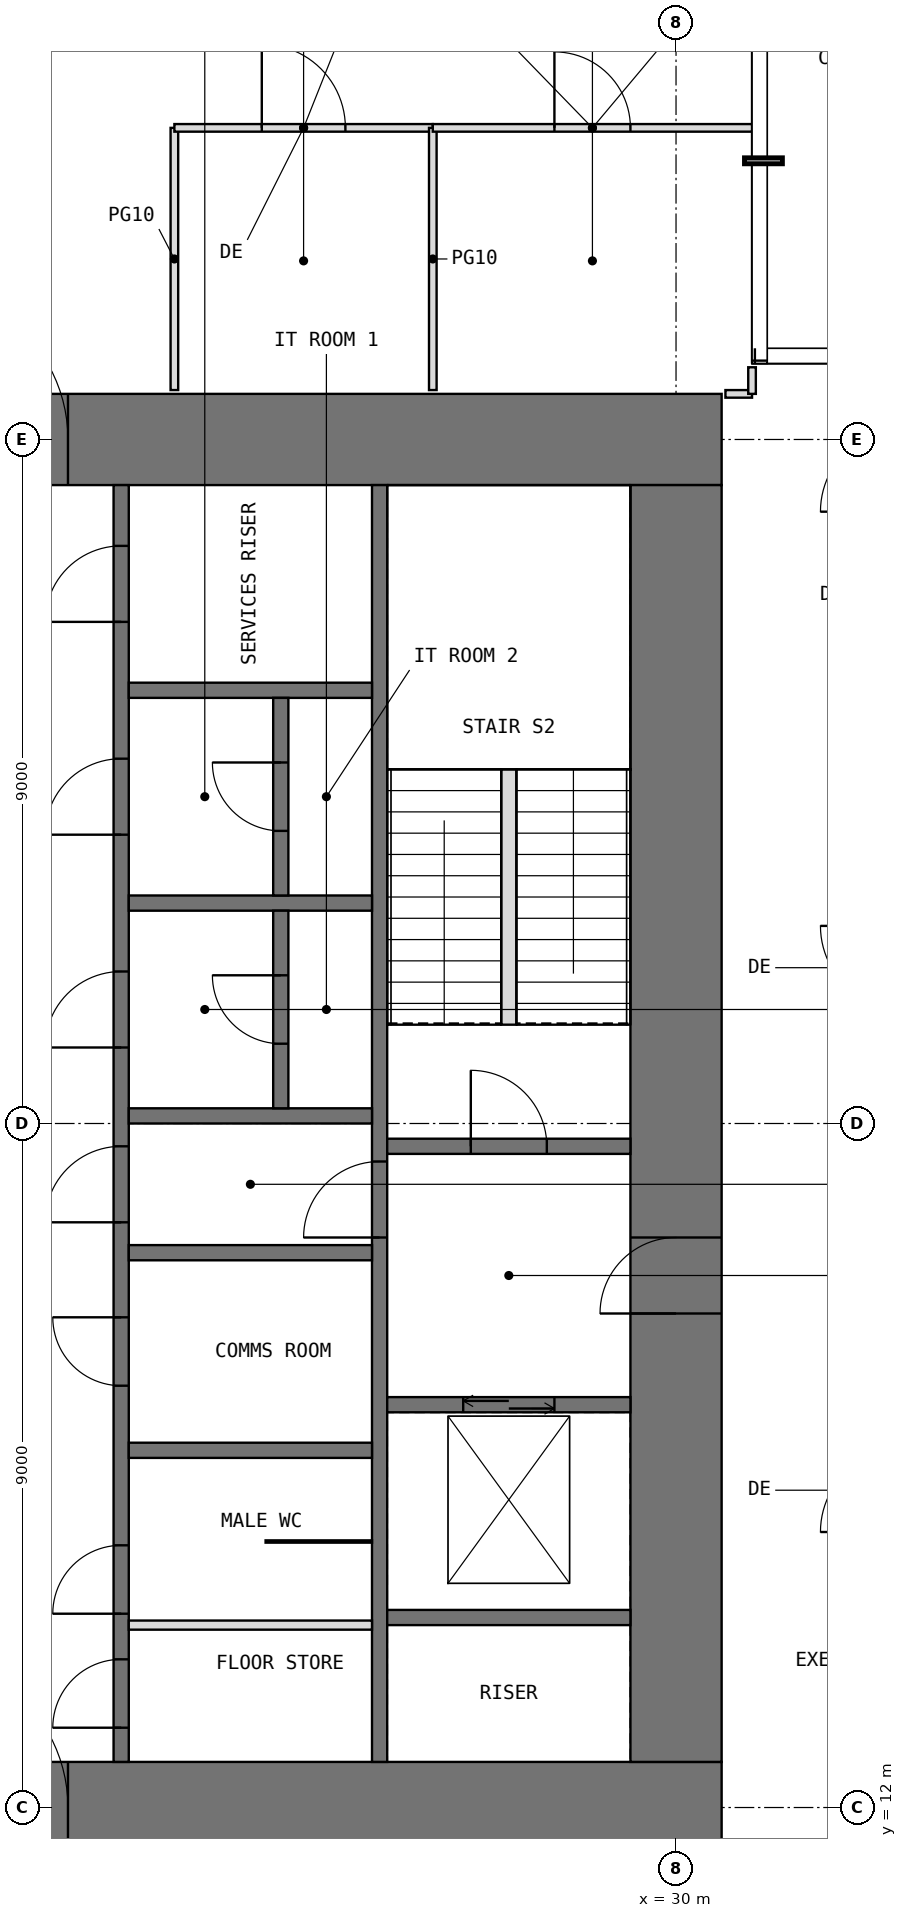
"""IFC4 building model, lengths in metres.
Left out: names, types, materials, properties, quantities, classifications, styles, units other than length and angle.
Written with IfcOpenShell. Run it as: python <this file> out.ifc"""

import sys

from ifc_helpers import new_model, si_unit, direction, frame, frame_2d, origin, place, context, subcontext, project, spatial, rectangle, extrude, element, fill, save


model = new_model("IFC4")
c1 = context("Model", 3, precision=1e-05, world=origin(), true_north=direction((0.0, 1.0)))
c2 = subcontext(c1, "Body", "Model", "MODEL_VIEW")
j1 = project(units=[si_unit("LENGTHUNIT", "METRE"), si_unit("PLANEANGLEUNIT", "RADIAN")], contexts=[c1])
p1 = place(None, origin())
s1 = spatial("IfcSite", under=j1, at=p1, CompositionType="ELEMENT")
p2 = place(p1, origin())
s2 = spatial("IfcBuilding", under=s1, at=p2, CompositionType="ELEMENT")
p3 = place(p2, frame((0.0, 0.0, 248.2)))
s3 = spatial("IfcBuildingStorey", under=s2, at=p3, CompositionType="ELEMENT", Elevation=248.2)
p4 = place(p3, frame((11.4, 12.0, -0.05), z_axis=(0.0, 0.0, 1.0), x_axis=(1.0, 0.0, 0.0)))
e1 = element("IfcWall", 1, at=p4, inside=s3, PredefinedType="SHEAR", context=c2, shape_type="SweptSolid", body=[
    extrude(rectangle(XDim=19.2, YDim=1.2, at=frame_2d((9.6, 0.0))), origin(), (0.0, 0.0, 1.0), 4.2),
])
p5 = place(p4, frame((8.6, 0.0, 0.05)))
e2 = element("IfcOpeningElement", 2, at=p5, cuts=e1, PredefinedType="OPENING", context=c2, shape_type="SweptSolid", body=[
    extrude(rectangle(XDim=2.0, YDim=2.2, at=frame_2d((1.0, 1.1))), frame((0.0, 0.61, 0.0), z_axis=(0.0, -1.0, 0.0), x_axis=(1.0, 0.0, 0.0)), (0.0, 0.0, 1.0), 1.22),
])
p6 = place(p3, frame((11.4, 30.0, -0.05), z_axis=(0.0, 0.0, 1.0), x_axis=(1.0, 0.0, 0.0)))
e3 = element("IfcWall", 3, at=p6, inside=s3, PredefinedType="SHEAR", context=c2, shape_type="SweptSolid", body=[
    extrude(rectangle(XDim=19.2, YDim=1.2, at=frame_2d((9.6, 0.0))), origin(), (0.0, 0.0, 1.0), 4.2),
])
p7 = place(p6, frame((8.6, 0.0, 0.05)))
e4 = element("IfcOpeningElement", 4, at=p7, cuts=e3, PredefinedType="OPENING", context=c2, shape_type="SweptSolid", body=[
    extrude(rectangle(XDim=2.0, YDim=2.2, at=frame_2d((1.0, 1.1))), frame((0.0, 0.61, 0.0), z_axis=(0.0, -1.0, 0.0), x_axis=(1.0, 0.0, 0.0)), (0.0, 0.0, 1.0), 1.22),
])
p8 = place(p3, frame((30.0, 12.6, -0.05), z_axis=(0.0, 0.0, 1.0), x_axis=(0.0, 1.0, 0.0)))
e5 = element("IfcWall", 5, at=p8, inside=s3, PredefinedType="SHEAR", context=c2, shape_type="SweptSolid", body=[
    extrude(rectangle(XDim=16.8, YDim=1.2, at=frame_2d((8.4, 0.0))), origin(), (0.0, 0.0, 1.0), 4.2),
])
p9 = place(p8, frame((5.9, 0.0, 0.05)))
e6 = element("IfcOpeningElement", 6, at=p9, cuts=e5, PredefinedType="OPENING", context=c2, shape_type="SweptSolid", body=[
    extrude(rectangle(XDim=1.0, YDim=2.2, at=frame_2d((0.5, 1.1))), frame((0.0, 0.61, 0.0), z_axis=(0.0, -1.0, 0.0), x_axis=(1.0, 0.0, 0.0)), (0.0, 0.0, 1.0), 1.22),
])
p10 = place(p3, frame((22.7, 12.6, -0.05), z_axis=(0.0, 0.0, 1.0), x_axis=(0.0, 1.0, 0.0)))
e7 = element("IfcWall", 7, at=p10, inside=s3, PredefinedType="SHEAR", context=c2, shape_type="SweptSolid", body=[
    extrude(rectangle(XDim=16.8, YDim=0.2, at=frame_2d((8.4, 0.0))), origin(), (0.0, 0.0, 1.0), 4.2),
])
p11 = place(p10, frame((0.45, 0.0, 0.05)))
e8 = element("IfcOpeningElement", 8, at=p11, cuts=e7, PredefinedType="OPENING", context=c2, shape_type="SweptSolid", body=[
    extrude(rectangle(XDim=0.9, YDim=2.2, at=frame_2d((0.45, 1.1))), frame((0.0, 0.11, 0.0), z_axis=(0.0, -1.0, 0.0), x_axis=(1.0, 0.0, 0.0)), (0.0, 0.0, 1.0), 0.22),
])
p12 = place(p10, frame((7.1, 0.0, 0.05)))
e9 = element("IfcOpeningElement", 9, at=p12, cuts=e7, PredefinedType="OPENING", context=c2, shape_type="SweptSolid", body=[
    extrude(rectangle(XDim=1.0, YDim=2.2, at=frame_2d((0.5, 1.1))), frame((0.0, 0.11, 0.0), z_axis=(0.0, -1.0, 0.0), x_axis=(1.0, 0.0, 0.0)), (0.0, 0.0, 1.0), 0.22),
])
p13 = place(p10, frame((1.95, 0.0, 0.05)))
e10 = element("IfcOpeningElement", 10, at=p13, cuts=e7, PredefinedType="OPENING", context=c2, shape_type="SweptSolid", body=[
    extrude(rectangle(XDim=0.9, YDim=2.2, at=frame_2d((0.45, 1.1))), frame((0.0, 0.11, 0.0), z_axis=(0.0, -1.0, 0.0), x_axis=(1.0, 0.0, 0.0)), (0.0, 0.0, 1.0), 0.22),
])
p14 = place(p10, frame((4.95, 0.0, 0.05)))
e11 = element("IfcOpeningElement", 11, at=p14, cuts=e7, PredefinedType="OPENING", context=c2, shape_type="SweptSolid", body=[
    extrude(rectangle(XDim=0.9, YDim=2.2, at=frame_2d((0.45, 1.1))), frame((0.0, 0.11, 0.0), z_axis=(0.0, -1.0, 0.0), x_axis=(1.0, 0.0, 0.0)), (0.0, 0.0, 1.0), 0.22),
])
p15 = place(p10, frame((9.4, 0.0, 0.05)))
e12 = element("IfcOpeningElement", 12, at=p15, cuts=e7, PredefinedType="OPENING", context=c2, shape_type="SweptSolid", body=[
    extrude(rectangle(XDim=1.0, YDim=2.2, at=frame_2d((0.5, 1.1))), frame((0.0, 0.11, 0.0), z_axis=(0.0, -1.0, 0.0), x_axis=(1.0, 0.0, 0.0)), (0.0, 0.0, 1.0), 0.22),
])
p16 = place(p10, frame((12.2, 0.0, 0.05)))
e13 = element("IfcOpeningElement", 13, at=p16, cuts=e7, PredefinedType="OPENING", context=c2, shape_type="SweptSolid", body=[
    extrude(rectangle(XDim=1.0, YDim=2.2, at=frame_2d((0.5, 1.1))), frame((0.0, 0.11, 0.0), z_axis=(0.0, -1.0, 0.0), x_axis=(1.0, 0.0, 0.0)), (0.0, 0.0, 1.0), 0.22),
])
p17 = place(p10, frame((15.0, 0.0, 0.05)))
e14 = element("IfcOpeningElement", 14, at=p17, cuts=e7, PredefinedType="OPENING", context=c2, shape_type="SweptSolid", body=[
    extrude(rectangle(XDim=1.0, YDim=2.2, at=frame_2d((0.5, 1.1))), frame((0.0, 0.11, 0.0), z_axis=(0.0, -1.0, 0.0), x_axis=(1.0, 0.0, 0.0)), (0.0, 0.0, 1.0), 0.22),
])
p18 = place(p3, frame((26.1, 12.6, -0.05), z_axis=(0.0, 0.0, 1.0), x_axis=(0.0, 1.0, 0.0)))
e15 = element("IfcWall", 15, at=p18, inside=s3, PredefinedType="SHEAR", context=c2, shape_type="SweptSolid", body=[
    extrude(rectangle(XDim=16.8, YDim=0.2, at=frame_2d((8.4, 0.0))), origin(), (0.0, 0.0, 1.0), 4.2),
])
p19 = place(p18, frame((6.9, 0.0, 0.05)))
e16 = element("IfcOpeningElement", 16, at=p19, cuts=e15, PredefinedType="OPENING", context=c2, shape_type="SweptSolid", body=[
    extrude(rectangle(XDim=1.0, YDim=2.2, at=frame_2d((0.5, 1.1))), frame((0.0, 0.11, 0.0), z_axis=(0.0, -1.0, 0.0), x_axis=(1.0, 0.0, 0.0)), (0.0, 0.0, 1.0), 0.22),
])
for number, where, z_axis, x_axis in (
    (17, (22.8, 16.7, -0.05), (0.0, 0.0, 1.0), (1.0, 0.0, 0.0)),
    (18, (22.8, 19.3, -0.05), (0.0, 0.0, 1.0), (1.0, 0.0, 0.0)),
    (19, (22.8, 21.1, -0.05), (0.0, 0.0, 1.0), (1.0, 0.0, 0.0)),
    (20, (22.8, 23.9, -0.05), (0.0, 0.0, 1.0), (1.0, 0.0, 0.0)),
    (21, (22.8, 26.7, -0.05), (0.0, 0.0, 1.0), (1.0, 0.0, 0.0)),
    (22, (26.2, 14.5, -0.05), (0.0, 0.0, 1.0), (1.0, 0.0, 0.0)),
):
    element("IfcWall", number, at=place(p3, frame(where, z_axis=z_axis, x_axis=x_axis)), inside=s3, PredefinedType="SHEAR", context=c2, shape_type="SweptSolid", body=[
        extrude(rectangle(XDim=3.2, YDim=0.2, at=frame_2d((1.6, 0.0))), origin(), (0.0, 0.0, 1.0), 4.2),
    ])
p20 = place(p3, frame((26.2, 17.3, -0.05), z_axis=(0.0, 0.0, 1.0), x_axis=(1.0, 0.0, 0.0)))
e23 = element("IfcWall", 23, at=p20, inside=s3, PredefinedType="SHEAR", context=c2, shape_type="SweptSolid", body=[
    extrude(rectangle(XDim=3.2, YDim=0.2, at=frame_2d((1.6, 0.0))), origin(), (0.0, 0.0, 1.0), 4.2),
])
p21 = place(p20, frame((1.0, 0.0, 0.05)))
e24 = element("IfcOpeningElement", 24, at=p21, cuts=e23, PredefinedType="OPENING", context=c2, shape_type="SweptSolid", body=[
    extrude(rectangle(XDim=1.2, YDim=2.2, at=frame_2d((0.6, 1.1))), frame((0.0, 0.11, 0.0), z_axis=(0.0, -1.0, 0.0), x_axis=(1.0, 0.0, 0.0)), (0.0, 0.0, 1.0), 0.22),
])
p22 = place(p3, frame((26.2, 20.7, -0.05), z_axis=(0.0, 0.0, 1.0), x_axis=(1.0, 0.0, 0.0)))
e25 = element("IfcWall", 25, at=p22, inside=s3, PredefinedType="SHEAR", context=c2, shape_type="SweptSolid", body=[
    extrude(rectangle(XDim=3.2, YDim=0.2, at=frame_2d((1.6, 0.0))), origin(), (0.0, 0.0, 1.0), 4.2),
])
p23 = place(p22, frame((1.1, 0.0, 0.05)))
e26 = element("IfcOpeningElement", 26, at=p23, cuts=e25, PredefinedType="OPENING", context=c2, shape_type="SweptSolid", body=[
    extrude(rectangle(XDim=1.0, YDim=2.2, at=frame_2d((0.5, 1.1))), frame((0.0, 0.11, 0.0), z_axis=(0.0, -1.0, 0.0), x_axis=(1.0, 0.0, 0.0)), (0.0, 0.0, 1.0), 0.22),
])
p24 = place(p3, frame((22.8, 14.4, 0.0), z_axis=(0.0, 0.0, 1.0), x_axis=(1.0, 0.0, 0.0)))
e27 = element("IfcWall", 27, at=p24, inside=s3, PredefinedType="PARTITIONING", context=c2, shape_type="SweptSolid", body=[
    extrude(rectangle(XDim=3.2, YDim=0.12, at=frame_2d((1.6, 0.0))), origin(), (0.0, 0.0, 1.0), 3.95),
])
p25 = place(p3, frame((24.6, 15.5, 0.0), z_axis=(0.0, 0.0, 1.0), x_axis=(1.0, 0.0, 0.0)))
e28 = element("IfcWall", 28, at=p25, inside=s3, PredefinedType="PARTITIONING", context=c2, shape_type="SweptSolid", body=[
    extrude(rectangle(XDim=1.4, YDim=0.03, at=frame_2d((0.7, 0.0))), origin(), (0.0, 0.0, 1.0), 3.95),
])
p26 = place(p3, frame((24.8, 21.2, -0.05), z_axis=(0.0, 0.0, 1.0), x_axis=(0.0, 1.0, 0.0)))
e29 = element("IfcWall", 29, at=p26, inside=s3, PredefinedType="SHEAR", context=c2, shape_type="SweptSolid", body=[
    extrude(rectangle(XDim=2.6, YDim=0.2, at=frame_2d((1.3, 0.0))), origin(), (0.0, 0.0, 1.0), 4.2),
])
p27 = place(p26, frame((0.85, 0.0, 0.05)))
e30 = element("IfcOpeningElement", 30, at=p27, cuts=e29, PredefinedType="OPENING", context=c2, shape_type="SweptSolid", body=[
    extrude(rectangle(XDim=0.9, YDim=2.2, at=frame_2d((0.45, 1.1))), frame((0.0, 0.11, 0.0), z_axis=(0.0, -1.0, 0.0), x_axis=(1.0, 0.0, 0.0)), (0.0, 0.0, 1.0), 0.22),
])
p28 = place(p3, frame((24.8, 24.0, -0.05), z_axis=(0.0, 0.0, 1.0), x_axis=(0.0, 1.0, 0.0)))
e31 = element("IfcWall", 31, at=p28, inside=s3, PredefinedType="SHEAR", context=c2, shape_type="SweptSolid", body=[
    extrude(rectangle(XDim=2.6, YDim=0.2, at=frame_2d((1.3, 0.0))), origin(), (0.0, 0.0, 1.0), 4.2),
])
p29 = place(p28, frame((0.85, 0.0, 0.05)))
e32 = element("IfcOpeningElement", 32, at=p29, cuts=e31, PredefinedType="OPENING", context=c2, shape_type="SweptSolid", body=[
    extrude(rectangle(XDim=0.9, YDim=2.2, at=frame_2d((0.45, 1.1))), frame((0.0, 0.11, 0.0), z_axis=(0.0, -1.0, 0.0), x_axis=(1.0, 0.0, 0.0)), (0.0, 0.0, 1.0), 0.22),
])
p30 = place(p3, frame((23.4, 30.65, 0.0), z_axis=(0.0, 0.0, 1.0), x_axis=(0.0, 1.0, 0.0)))
e33 = element("IfcWall", 33, at=p30, inside=s3, PredefinedType="PARTITIONING", context=c2, shape_type="SweptSolid", body=[
    extrude(rectangle(XDim=3.45, YDim=0.1, at=frame_2d((1.725, 0.0))), origin(), (0.0, 0.0, 1.0), 3.95),
])
p31 = place(p3, frame((23.4, 34.1, 0.0), z_axis=(0.0, 0.0, 1.0), x_axis=(1.0, 0.0, 0.0)))
e34 = element("IfcWall", 34, at=p31, inside=s3, PredefinedType="PARTITIONING", context=c2, shape_type="SweptSolid", body=[
    extrude(rectangle(XDim=3.4, YDim=0.1, at=frame_2d((1.7, 0.0))), origin(), (0.0, 0.0, 1.0), 3.95),
])
p32 = place(p31, frame((1.15, 0.0, 0.0)))
e35 = element("IfcOpeningElement", 35, at=p32, cuts=e34, PredefinedType="OPENING", context=c2, shape_type="SweptSolid", body=[
    extrude(rectangle(XDim=1.1, YDim=2.3, at=frame_2d((0.55, 1.15))), frame((0.0, 0.06, 0.0), z_axis=(0.0, -1.0, 0.0), x_axis=(1.0, 0.0, 0.0)), (0.0, 0.0, 1.0), 0.12),
])
p33 = place(p3, frame((26.8, 30.65, 0.0), z_axis=(0.0, 0.0, 1.0), x_axis=(0.0, 1.0, 0.0)))
e36 = element("IfcWall", 36, at=p33, inside=s3, PredefinedType="PARTITIONING", context=c2, shape_type="SweptSolid", body=[
    extrude(rectangle(XDim=3.45, YDim=0.1, at=frame_2d((1.725, 0.0))), origin(), (0.0, 0.0, 1.0), 3.95),
])
p34 = place(p3, frame((26.8, 34.1, 0.0), z_axis=(0.0, 0.0, 1.0), x_axis=(1.0, 0.0, 0.0)))
e37 = element("IfcWall", 37, at=p34, inside=s3, PredefinedType="PARTITIONING", context=c2, shape_type="SweptSolid", body=[
    extrude(rectangle(XDim=4.2, YDim=0.1, at=frame_2d((2.1, 0.0))), origin(), (0.0, 0.0, 1.0), 3.95),
])
p35 = place(p34, frame((1.6, 0.0, 0.0)))
e38 = element("IfcOpeningElement", 38, at=p35, cuts=e37, PredefinedType="OPENING", context=c2, shape_type="SweptSolid", body=[
    extrude(rectangle(XDim=1.0, YDim=2.2, at=frame_2d((0.5, 1.1))), frame((0.0, 0.06, 0.0), z_axis=(0.0, -1.0, 0.0), x_axis=(1.0, 0.0, 0.0)), (0.0, 0.0, 1.0), 0.12),
])
p36 = place(p3, frame((30.65, 30.6, 0.0), z_axis=(0.0, 0.0, 1.0), x_axis=(1.0, 0.0, 0.0)))
e39 = element("IfcWall", 39, at=p36, inside=s3, PredefinedType="PARTITIONING", context=c2, shape_type="SweptSolid", body=[
    extrude(rectangle(XDim=0.35, YDim=0.1, at=frame_2d((0.175, 0.0))), origin(), (0.0, 0.0, 1.0), 3.95),
])
p37 = place(p3, frame((31.0, 30.6, 0.0), z_axis=(0.0, 0.0, 1.0), x_axis=(0.0, 1.0, 0.0)))
e40 = element("IfcWall", 40, at=p37, inside=s3, PredefinedType="PARTITIONING", context=c2, shape_type="SweptSolid", body=[
    extrude(rectangle(XDim=0.35, YDim=0.1, at=frame_2d((0.175, 0.0))), origin(), (0.0, 0.0, 1.0), 3.95),
])
p38 = place(p3, frame((27.8, 22.3, 0.0), z_axis=(0.0, 0.0, 1.0), x_axis=(0.0, 1.0, 0.0)))
e41 = element("IfcWall", 41, at=p38, inside=s3, PredefinedType="PARTITIONING", context=c2, shape_type="SweptSolid", body=[
    extrude(rectangle(XDim=3.36, YDim=0.2, at=frame_2d((1.68, 0.0))), origin(), (0.0, 0.0, 1.0), 4.2),
])
p39 = place(p5, origin())
e42 = element("IfcDoor", 42, at=p39, inside=s3, OperationType="DOUBLE_DOOR_SINGLE_SWING", PredefinedType="DOOR", context=c2, shape_type="SweptSolid", body=[
    extrude(rectangle(XDim=2.0, YDim=2.2, at=frame_2d((1.0, 1.1))), frame((0.0, 0.025, 0.0), z_axis=(0.0, -1.0, 0.0), x_axis=(1.0, 0.0, 0.0)), (0.0, 0.0, 1.0), 0.05),
])
fill(e2, e42)
p40 = place(p7, origin())
e43 = element("IfcDoor", 43, at=p40, inside=s3, OperationType="DOUBLE_DOOR_SINGLE_SWING", PredefinedType="DOOR", context=c2, shape_type="SweptSolid", body=[
    extrude(rectangle(XDim=2.0, YDim=2.2, at=frame_2d((1.0, 1.1))), frame((0.0, 0.025, 0.0), z_axis=(0.0, -1.0, 0.0), x_axis=(1.0, 0.0, 0.0)), (0.0, 0.0, 1.0), 0.05),
])
fill(e4, e43)
p41 = place(p11, origin())
e44 = element("IfcDoor", 44, at=p41, inside=s3, OperationType="SINGLE_SWING_LEFT", PredefinedType="DOOR", context=c2, shape_type="SweptSolid", body=[
    extrude(rectangle(XDim=0.9, YDim=2.2, at=frame_2d((0.45, 1.1))), frame((0.0, 0.025, 0.0), z_axis=(0.0, -1.0, 0.0), x_axis=(1.0, 0.0, 0.0)), (0.0, 0.0, 1.0), 0.05),
])
fill(e8, e44)
p42 = place(p9, origin())
e45 = element("IfcDoor", 45, at=p42, inside=s3, OperationType="SINGLE_SWING_LEFT", PredefinedType="DOOR", context=c2, shape_type="SweptSolid", body=[
    extrude(rectangle(XDim=1.0, YDim=2.2, at=frame_2d((0.5, 1.1))), frame((0.0, 0.025, 0.0), z_axis=(0.0, -1.0, 0.0), x_axis=(1.0, 0.0, 0.0)), (0.0, 0.0, 1.0), 0.05),
])
fill(e6, e45)
p43 = place(p23, origin())
e46 = element("IfcDoor", 46, at=p43, inside=s3, OperationType="SINGLE_SWING_LEFT", PredefinedType="DOOR", context=c2, shape_type="SweptSolid", body=[
    extrude(rectangle(XDim=1.0, YDim=2.2, at=frame_2d((0.5, 1.1))), frame((0.0, 0.025, 0.0), z_axis=(0.0, -1.0, 0.0), x_axis=(1.0, 0.0, 0.0)), (0.0, 0.0, 1.0), 0.05),
])
fill(e26, e46)
p44 = place(p19, origin())
e47 = element("IfcDoor", 47, at=p44, inside=s3, OperationType="SINGLE_SWING_LEFT", PredefinedType="DOOR", context=c2, shape_type="SweptSolid", body=[
    extrude(rectangle(XDim=1.0, YDim=2.2, at=frame_2d((0.5, 1.1))), frame((0.0, 0.025, 0.0), z_axis=(0.0, -1.0, 0.0), x_axis=(1.0, 0.0, 0.0)), (0.0, 0.0, 1.0), 0.05),
])
fill(e16, e47)
p45 = place(p12, origin())
e48 = element("IfcDoor", 48, at=p45, inside=s3, OperationType="SINGLE_SWING_LEFT", PredefinedType="DOOR", context=c2, shape_type="SweptSolid", body=[
    extrude(rectangle(XDim=1.0, YDim=2.2, at=frame_2d((0.5, 1.1))), frame((0.0, 0.025, 0.0), z_axis=(0.0, -1.0, 0.0), x_axis=(1.0, 0.0, 0.0)), (0.0, 0.0, 1.0), 0.05),
])
fill(e9, e48)
p46 = place(p13, origin())
e49 = element("IfcDoor", 49, at=p46, inside=s3, OperationType="SINGLE_SWING_LEFT", PredefinedType="DOOR", context=c2, shape_type="SweptSolid", body=[
    extrude(rectangle(XDim=0.9, YDim=2.2, at=frame_2d((0.45, 1.1))), frame((0.0, 0.025, 0.0), z_axis=(0.0, -1.0, 0.0), x_axis=(1.0, 0.0, 0.0)), (0.0, 0.0, 1.0), 0.05),
])
fill(e10, e49)
p47 = place(p14, origin())
e50 = element("IfcDoor", 50, at=p47, inside=s3, OperationType="SINGLE_SWING_RIGHT", PredefinedType="DOOR", context=c2, shape_type="SweptSolid", body=[
    extrude(rectangle(XDim=0.9, YDim=2.2, at=frame_2d((0.45, 1.1))), frame((0.0, 0.025, 0.0), z_axis=(0.0, -1.0, 0.0), x_axis=(1.0, 0.0, 0.0)), (0.0, 0.0, 1.0), 0.05),
])
fill(e11, e50)
p48 = place(p15, origin())
e51 = element("IfcDoor", 51, at=p48, inside=s3, OperationType="SINGLE_SWING_LEFT", PredefinedType="DOOR", context=c2, shape_type="SweptSolid", body=[
    extrude(rectangle(XDim=1.0, YDim=2.2, at=frame_2d((0.5, 1.1))), frame((0.0, 0.025, 0.0), z_axis=(0.0, -1.0, 0.0), x_axis=(1.0, 0.0, 0.0)), (0.0, 0.0, 1.0), 0.05),
])
fill(e12, e51)
p49 = place(p27, origin())
e52 = element("IfcDoor", 52, at=p49, inside=s3, OperationType="SINGLE_SWING_RIGHT", PredefinedType="DOOR", context=c2, shape_type="SweptSolid", body=[
    extrude(rectangle(XDim=0.9, YDim=2.2, at=frame_2d((0.45, 1.1))), frame((0.0, 0.025, 0.0), z_axis=(0.0, -1.0, 0.0), x_axis=(1.0, 0.0, 0.0)), (0.0, 0.0, 1.0), 0.05),
])
fill(e30, e52)
p50 = place(p16, origin())
e53 = element("IfcDoor", 53, at=p50, inside=s3, OperationType="SINGLE_SWING_LEFT", PredefinedType="DOOR", context=c2, shape_type="SweptSolid", body=[
    extrude(rectangle(XDim=1.0, YDim=2.2, at=frame_2d((0.5, 1.1))), frame((0.0, 0.025, 0.0), z_axis=(0.0, -1.0, 0.0), x_axis=(1.0, 0.0, 0.0)), (0.0, 0.0, 1.0), 0.05),
])
fill(e13, e53)
p51 = place(p29, origin())
e54 = element("IfcDoor", 54, at=p51, inside=s3, OperationType="SINGLE_SWING_RIGHT", PredefinedType="DOOR", context=c2, shape_type="SweptSolid", body=[
    extrude(rectangle(XDim=0.9, YDim=2.2, at=frame_2d((0.45, 1.1))), frame((0.0, 0.025, 0.0), z_axis=(0.0, -1.0, 0.0), x_axis=(1.0, 0.0, 0.0)), (0.0, 0.0, 1.0), 0.05),
])
fill(e32, e54)
p52 = place(p17, origin())
e55 = element("IfcDoor", 55, at=p52, inside=s3, OperationType="SINGLE_SWING_LEFT", PredefinedType="DOOR", context=c2, shape_type="SweptSolid", body=[
    extrude(rectangle(XDim=1.0, YDim=2.2, at=frame_2d((0.5, 1.1))), frame((0.0, 0.025, 0.0), z_axis=(0.0, -1.0, 0.0), x_axis=(1.0, 0.0, 0.0)), (0.0, 0.0, 1.0), 0.05),
])
fill(e14, e55)
p53 = place(p32, origin())
e56 = element("IfcDoor", 56, at=p53, inside=s3, OperationType="SINGLE_SWING_LEFT", PredefinedType="DOOR", context=c2, shape_type="SweptSolid", body=[
    extrude(rectangle(XDim=1.1, YDim=2.3, at=frame_2d((0.55, 1.15))), frame((0.0, 0.025, 0.0), z_axis=(0.0, -1.0, 0.0), x_axis=(1.0, 0.0, 0.0)), (0.0, 0.0, 1.0), 0.05),
])
fill(e35, e56)
p54 = place(p35, origin())
e57 = element("IfcDoor", 57, at=p54, inside=s3, OperationType="SINGLE_SWING_LEFT", PredefinedType="DOOR", context=c2, shape_type="SweptSolid", body=[
    extrude(rectangle(XDim=1.0, YDim=2.2, at=frame_2d((0.5, 1.1))), frame((0.0, 0.025, 0.0), z_axis=(0.0, -1.0, 0.0), x_axis=(1.0, 0.0, 0.0)), (0.0, 0.0, 1.0), 0.05),
])
fill(e38, e57)
p55 = place(p21, origin())
e58 = element("IfcDoor", 58, at=p55, inside=s3, OperationType="DOUBLE_DOOR_SLIDING", PredefinedType="DOOR", context=c2, shape_type="SweptSolid", body=[
    extrude(rectangle(XDim=1.2, YDim=2.2, at=frame_2d((0.6, 1.1))), frame((0.0, 0.025, 0.0), z_axis=(0.0, -1.0, 0.0), x_axis=(1.0, 0.0, 0.0)), (0.0, 0.0, 1.0), 0.05),
])
fill(e24, e58)
save(model, sys.argv[1])
